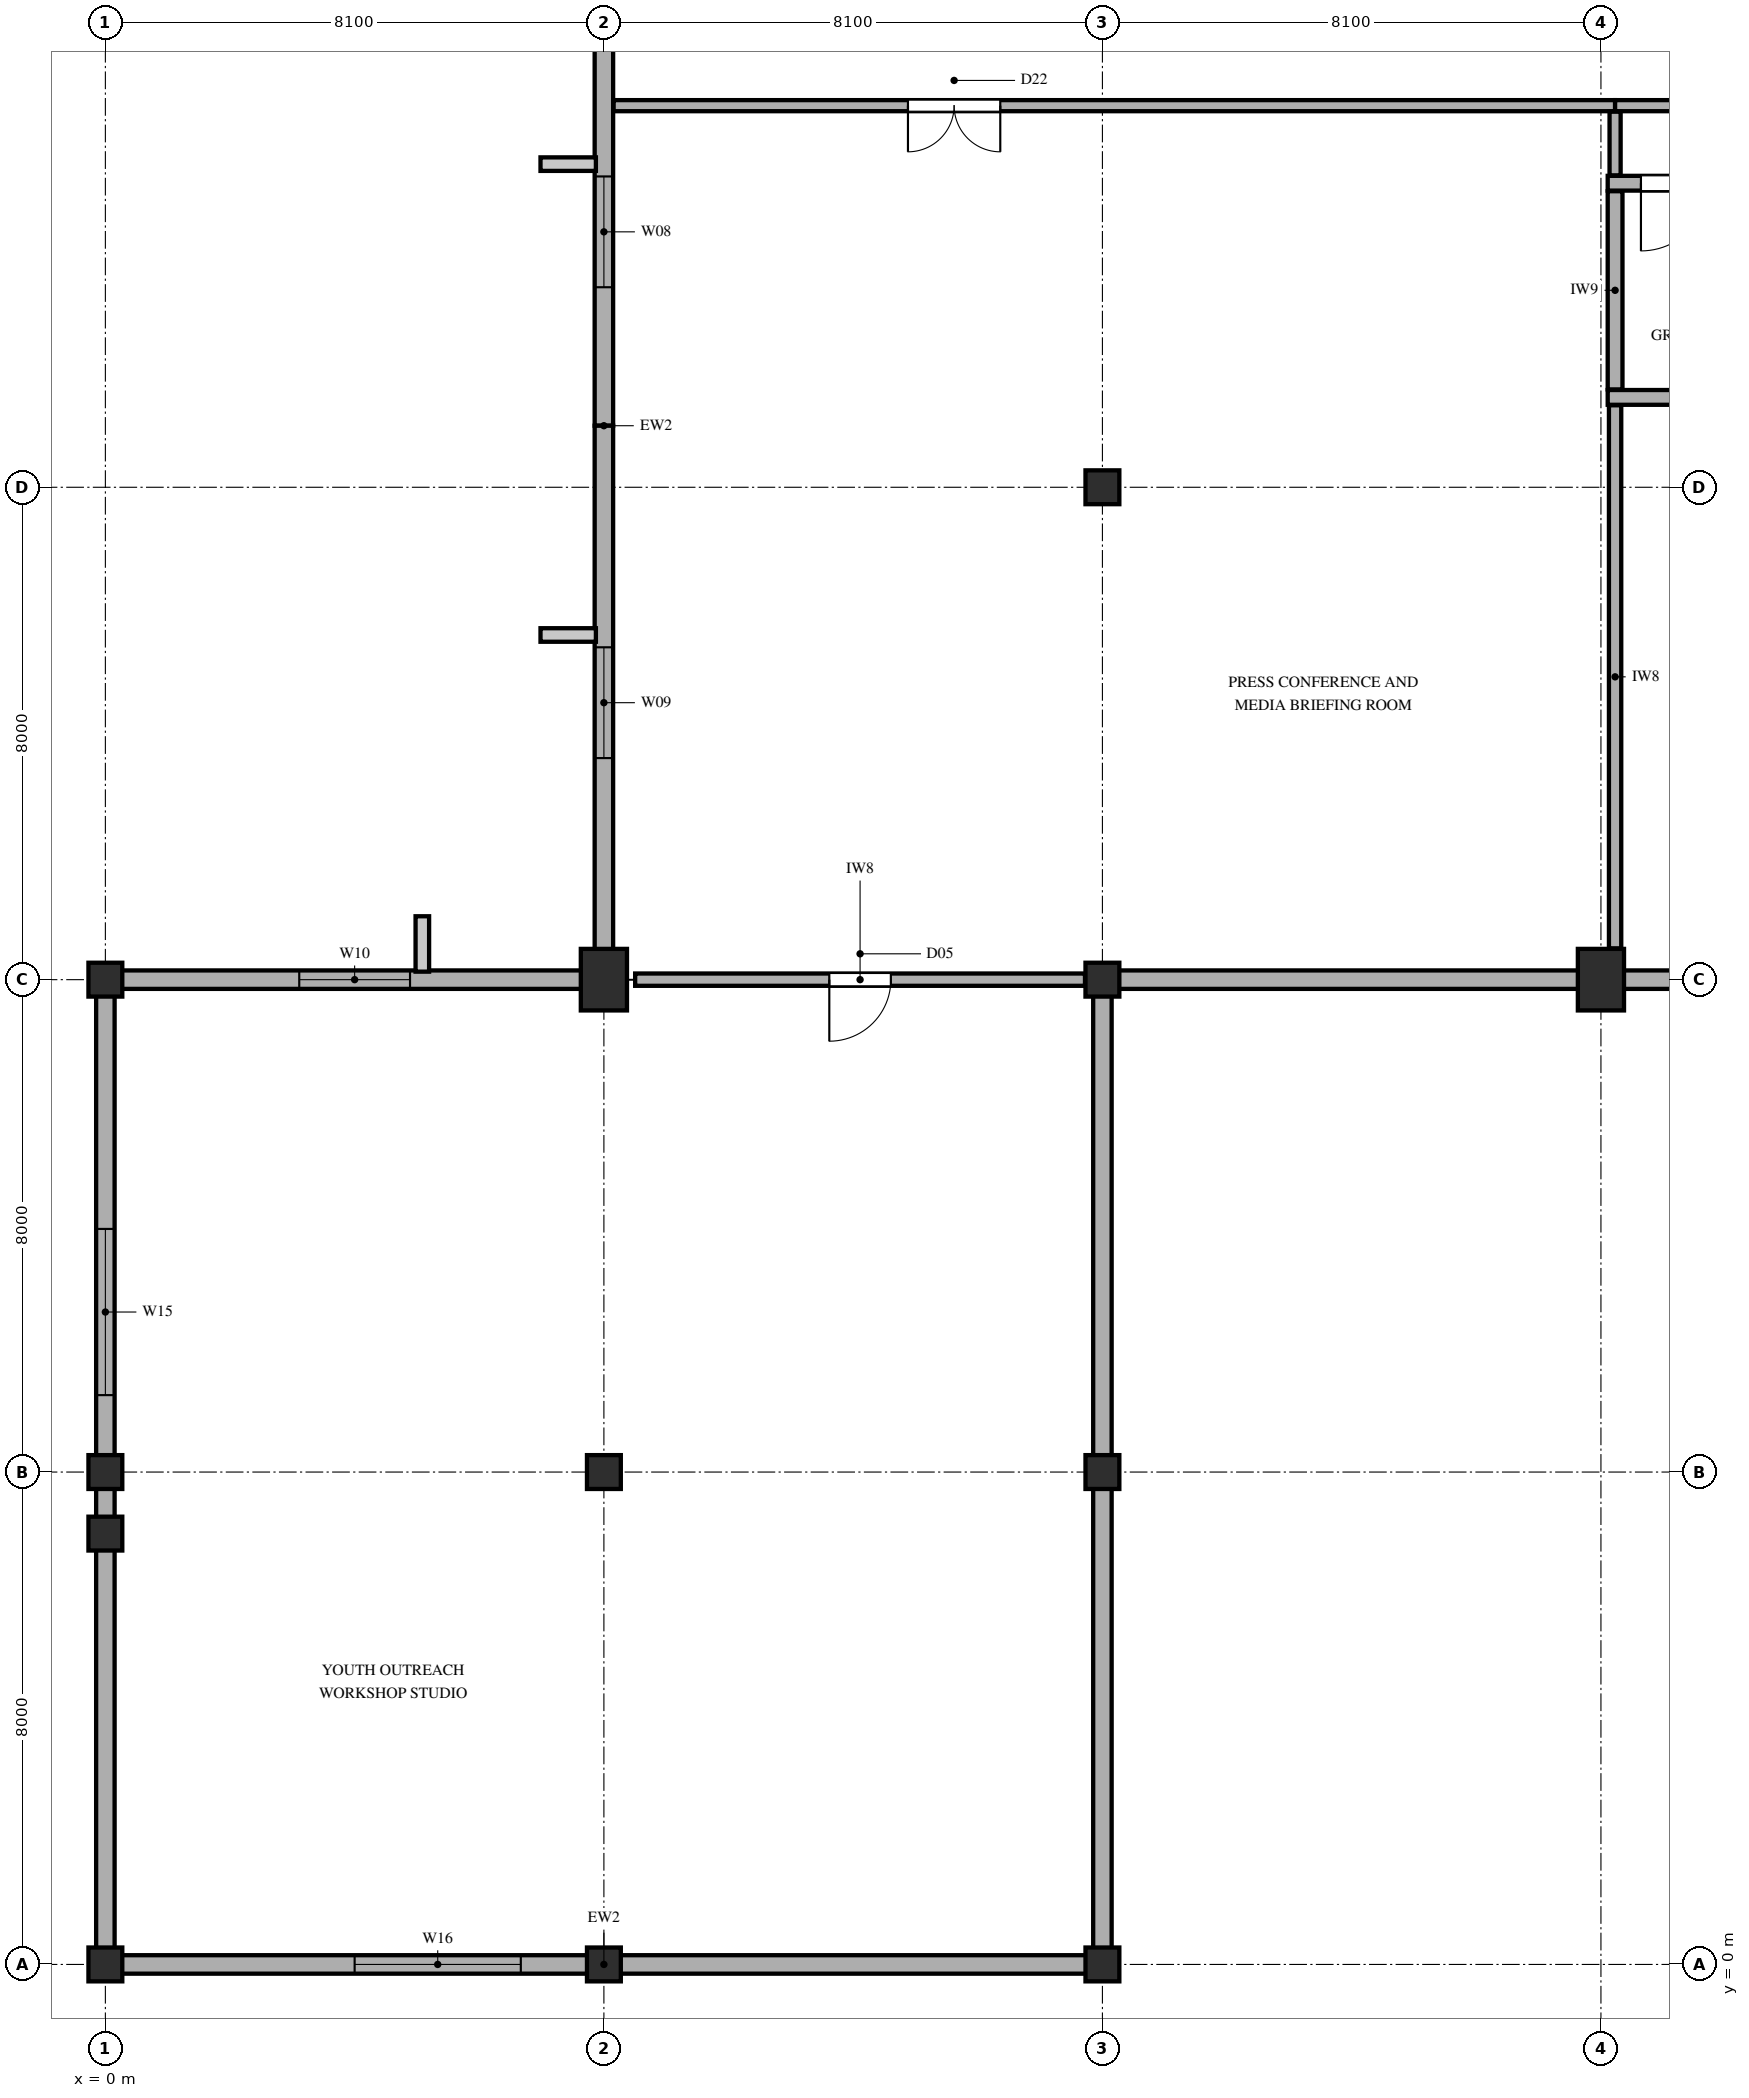
"""IFC4 building model, lengths in metres.
Left out: names, types, materials, properties, quantities, classifications, styles, units other than length and angle.
Written with IfcOpenShell. Run it as: python <this file> out.ifc"""

import sys

from ifc_helpers import new_model, si_unit, direction, frame, frame_2d, origin, origin_with_axes, origin_2d, place, context, subcontext, project, spatial, rectangle, extrude, element, fill, save


model = new_model("IFC4")
c1 = context("Model", 3, precision=1e-05, world=origin(), true_north=direction((0.0, 1.0)))
c2 = subcontext(c1, "Body", "Model", "MODEL_VIEW")
j1 = project(units=[si_unit("LENGTHUNIT", "METRE"), si_unit("PLANEANGLEUNIT", "RADIAN")], contexts=[c1])
p1 = place(None, origin())
s1 = spatial("IfcSite", under=j1, at=p1, CompositionType="ELEMENT")
p2 = place(p1, origin())
s2 = spatial("IfcBuilding", under=s1, at=p2, CompositionType="ELEMENT")
p3 = place(p2, frame((0.0, 0.0, 5.4)))
s3 = spatial("IfcBuildingStorey", under=s2, at=p3, CompositionType="ELEMENT", Elevation=5.4)
for number, where, z_axis, x_axis in (
    (1, (0.0, 0.0, 0.0), (0.0, 0.0, 1.0), (1.0, 0.0, 0.0)),
    (2, (0.0, 7.0, 0.0), (0.0, 0.0, 1.0), (1.0, 0.0, 0.0)),
    (3, (0.0, 8.0, 0.0), (0.0, 0.0, 1.0), (1.0, 0.0, 0.0)),
    (4, (0.0, 16.0, 0.0), (0.0, 0.0, 1.0), (1.0, 0.0, 0.0)),
    (5, (8.1, 0.0, 0.0), (0.0, 0.0, 1.0), (1.0, 0.0, 0.0)),
    (6, (8.1, 8.0, 0.0), (0.0, 0.0, 1.0), (1.0, 0.0, 0.0)),
):
    element("IfcColumn", number, at=place(p3, frame(where, z_axis=z_axis, x_axis=x_axis)), inside=s3, PredefinedType="COLUMN", context=c2, shape_type="SweptSolid", body=[
        extrude(rectangle(XDim=0.55, YDim=0.55, at=origin_2d()), origin(), (0.0, 0.0, 1.0), 4.8),
    ])
p4 = place(p3, frame((8.1, 16.0, 0.0), z_axis=(0.0, 0.0, 1.0), x_axis=(1.0, 0.0, 0.0)))
e7 = element("IfcColumn", 7, at=p4, inside=s3, PredefinedType="COLUMN", context=c2, shape_type="SweptSolid", body=[
    extrude(rectangle(XDim=0.75, YDim=1.0, at=origin_2d()), origin(), (0.0, 0.0, 1.0), 4.8),
])
for number, where, z_axis, x_axis in (
    (8, (16.2, 0.0, 0.0), (0.0, 0.0, 1.0), (1.0, 0.0, 0.0)),
    (9, (16.2, 8.0, 0.0), (0.0, 0.0, 1.0), (1.0, 0.0, 0.0)),
    (10, (16.2, 16.0, 0.0), (0.0, 0.0, 1.0), (1.0, 0.0, 0.0)),
    (11, (16.2, 24.0, 0.0), (0.0, 0.0, 1.0), (1.0, 0.0, 0.0)),
):
    element("IfcColumn", number, at=place(p3, frame(where, z_axis=z_axis, x_axis=x_axis)), inside=s3, PredefinedType="COLUMN", context=c2, shape_type="SweptSolid", body=[
        extrude(rectangle(XDim=0.55, YDim=0.55, at=origin_2d()), origin(), (0.0, 0.0, 1.0), 4.8),
    ])
p5 = place(p3, frame((24.3, 16.0, 0.0), z_axis=(0.0, 0.0, 1.0), x_axis=(1.0, 0.0, 0.0)))
e12 = element("IfcColumn", 12, at=p5, inside=s3, PredefinedType="COLUMN", context=c2, shape_type="SweptSolid", body=[
    extrude(rectangle(XDim=0.75, YDim=1.0, at=origin_2d()), origin(), (0.0, 0.0, 1.0), 4.8),
])
p6 = place(p3, frame((0.0, 16.0, 0.0), z_axis=(0.0, 0.0, 1.0), x_axis=(0.0, -1.0, 0.0)))
e13 = element("IfcWall", 13, at=p6, inside=s3, PredefinedType="SOLIDWALL", context=c2, shape_type="SweptSolid", body=[
    extrude(rectangle(XDim=16.0, YDim=0.3, at=frame_2d((8.0, 0.0))), origin(), (0.0, 0.0, 1.0), 3.912),
])
p7 = place(p6, frame((4.05, 0.0, 0.95)))
e14 = element("IfcOpeningElement", 14, at=p7, cuts=e13, PredefinedType="OPENING", context=c2, shape_type="SweptSolid", body=[
    extrude(rectangle(XDim=2.7, YDim=1.8, at=frame_2d((1.35, 0.9))), frame((0.0, 0.16, 0.0), z_axis=(0.0, -1.0, 0.0), x_axis=(1.0, 0.0, 0.0)), (0.0, 0.0, 1.0), 0.32),
])
p8 = place(p3, origin_with_axes())
e15 = element("IfcWall", 15, at=p8, inside=s3, PredefinedType="SOLIDWALL", context=c2, shape_type="SweptSolid", body=[
    extrude(rectangle(XDim=16.2, YDim=0.3, at=frame_2d((8.1, 0.0))), origin(), (0.0, 0.0, 1.0), 3.812),
])
p9 = place(p8, frame((4.05, 0.0, 0.85)))
e16 = element("IfcOpeningElement", 16, at=p9, cuts=e15, PredefinedType="OPENING", context=c2, shape_type="SweptSolid", body=[
    extrude(rectangle(XDim=2.7, YDim=2.1, at=frame_2d((1.35, 1.05))), frame((0.0, 0.16, 0.0), z_axis=(0.0, -1.0, 0.0), x_axis=(1.0, 0.0, 0.0)), (0.0, 0.0, 1.0), 0.32),
])
p10 = place(p3, frame((16.2, 0.0, 0.0), z_axis=(0.0, 0.0, 1.0), x_axis=(0.0, 1.0, 0.0)))
e17 = element("IfcWall", 17, at=p10, inside=s3, PredefinedType="SOLIDWALL", context=c2, shape_type="SweptSolid", body=[
    extrude(rectangle(XDim=16.0, YDim=0.3, at=frame_2d((8.0, 0.0))), origin(), (0.0, 0.0, 1.0), 3.912),
])
p11 = place(p3, frame((16.2, 16.0, 0.0), z_axis=(0.0, 0.0, 1.0), x_axis=(1.0, 0.0, 0.0)))
e18 = element("IfcWall", 18, at=p11, inside=s3, PredefinedType="SOLIDWALL", context=c2, shape_type="SweptSolid", body=[
    extrude(rectangle(XDim=16.2, YDim=0.3, at=frame_2d((8.1, 0.0))), origin(), (0.0, 0.0, 1.0), 3.812),
])
p12 = place(p3, frame((8.1, 34.0, 0.0), z_axis=(0.0, 0.0, 1.0), x_axis=(0.0, -1.0, 0.0)))
e19 = element("IfcWall", 19, at=p12, inside=s3, PredefinedType="SOLIDWALL", context=c2, shape_type="SweptSolid", body=[
    extrude(rectangle(XDim=9.0, YDim=0.3, at=frame_2d((4.5, 0.0))), origin(), (0.0, 0.0, 1.0), 3.312),
])
p13 = place(p12, frame((4.95, 0.0, 0.95)))
e20 = element("IfcOpeningElement", 20, at=p13, cuts=e19, PredefinedType="OPENING", context=c2, shape_type="SweptSolid", body=[
    extrude(rectangle(XDim=1.8, YDim=1.5, at=frame_2d((0.9, 0.75))), frame((0.0, 0.16, 0.0), z_axis=(0.0, -1.0, 0.0), x_axis=(1.0, 0.0, 0.0)), (0.0, 0.0, 1.0), 0.32),
])
p14 = place(p3, frame((8.1, 25.0, 0.0), z_axis=(0.0, 0.0, 1.0), x_axis=(0.0, -1.0, 0.0)))
e21 = element("IfcWall", 21, at=p14, inside=s3, PredefinedType="SOLIDWALL", context=c2, shape_type="SweptSolid", body=[
    extrude(rectangle(XDim=9.0, YDim=0.3, at=frame_2d((4.5, 0.0))), origin(), (0.0, 0.0, 1.0), 3.312),
])
p15 = place(p14, frame((3.6, 0.0, 0.95)))
e22 = element("IfcOpeningElement", 22, at=p15, cuts=e21, PredefinedType="OPENING", context=c2, shape_type="SweptSolid", body=[
    extrude(rectangle(XDim=1.8, YDim=1.8, at=frame_2d((0.9, 0.9))), frame((0.0, 0.16, 0.0), z_axis=(0.0, -1.0, 0.0), x_axis=(1.0, 0.0, 0.0)), (0.0, 0.0, 1.0), 0.32),
])
p16 = place(p3, frame((8.1, 16.0, 0.0), z_axis=(0.0, 0.0, 1.0), x_axis=(-1.0, 0.0, 0.0)))
e23 = element("IfcWall", 23, at=p16, inside=s3, PredefinedType="SOLIDWALL", context=c2, shape_type="SweptSolid", body=[
    extrude(rectangle(XDim=8.1, YDim=0.3, at=frame_2d((4.05, 0.0))), origin(), (0.0, 0.0, 1.0), 3.812),
])
p17 = place(p16, frame((3.15, 0.0, 0.85)))
e24 = element("IfcOpeningElement", 24, at=p17, cuts=e23, PredefinedType="OPENING", context=c2, shape_type="SweptSolid", body=[
    extrude(rectangle(XDim=1.8, YDim=2.1, at=frame_2d((0.9, 1.05))), frame((0.0, 0.16, 0.0), z_axis=(0.0, -1.0, 0.0), x_axis=(1.0, 0.0, 0.0)), (0.0, 0.0, 1.0), 0.32),
])
p18 = place(p3, frame((16.6, 12.35, 1.2), z_axis=(0.0, 0.0, 1.0), x_axis=(1.0, 0.0, 0.0)))
e25 = element("IfcWall", 25, at=p18, inside=s3, PredefinedType="PARAPET", context=c2, shape_type="SweptSolid", body=[
    extrude(rectangle(XDim=47.9, YDim=0.22, at=frame_2d((23.95, 0.0))), origin(), (0.0, 0.0, 1.0), 0.55),
])
p19 = place(p3, frame((16.47, 12.48, 1.2), z_axis=(0.0, 0.0, 1.0), x_axis=(0.0, 1.0, 0.0)))
e26 = element("IfcWall", 26, at=p19, inside=s3, PredefinedType="PARAPET", context=c2, shape_type="SweptSolid", body=[
    extrude(rectangle(XDim=3.32, YDim=0.22, at=frame_2d((1.66, 0.0))), origin(), (0.0, 0.0, 1.0), 0.55),
])
p20 = place(p3, frame((24.41, 25.46, 0.0), z_axis=(0.0, 0.0, 1.0), x_axis=(1.0, 0.0, 0.0)))
e27 = element("IfcWall", 27, at=p20, inside=s3, PredefinedType="PARTITIONING", context=c2, shape_type="SweptSolid", body=[
    extrude(rectangle(XDim=7.78, YDim=0.24, at=frame_2d((3.89, 0.0))), origin(), (0.0, 0.0, 1.0), 4.52),
])
p21 = place(p3, frame((24.41, 28.94, 0.0), z_axis=(0.0, 0.0, 1.0), x_axis=(1.0, 0.0, 0.0)))
e28 = element("IfcWall", 28, at=p21, inside=s3, PredefinedType="PARTITIONING", context=c2, shape_type="SweptSolid", body=[
    extrude(rectangle(XDim=7.78, YDim=0.24, at=frame_2d((3.89, 0.0))), origin(), (0.0, 0.0, 1.0), 4.52),
])
p22 = place(p21, frame((0.54, 0.0, 0.0)))
e29 = element("IfcOpeningElement", 29, at=p22, cuts=e28, PredefinedType="OPENING", context=c2, shape_type="SweptSolid", body=[
    extrude(rectangle(XDim=1.1, YDim=2.2, at=frame_2d((0.55, 1.1))), frame((0.0, 0.13, 0.0), z_axis=(0.0, -1.0, 0.0), x_axis=(1.0, 0.0, 0.0)), (0.0, 0.0, 1.0), 0.26),
])
p23 = place(p3, frame((24.53, 25.59, 0.0), z_axis=(0.0, 0.0, 1.0), x_axis=(0.0, 1.0, 0.0)))
e30 = element("IfcWall", 30, at=p23, inside=s3, PredefinedType="PARTITIONING", context=c2, shape_type="SweptSolid", body=[
    extrude(rectangle(XDim=3.22, YDim=0.24, at=frame_2d((1.61, 0.0))), origin(), (0.0, 0.0, 1.0), 3.312),
])
p24 = place(p3, frame((8.608, 16.0, 0.0), z_axis=(0.0, 0.0, 1.0), x_axis=(1.0, 0.0, 0.0)))
e31 = element("IfcWall", 31, at=p24, inside=s3, PredefinedType="PARTITIONING", context=c2, shape_type="SweptSolid", body=[
    extrude(rectangle(XDim=7.309, YDim=0.2, at=frame_2d((3.655, 0.0))), origin(), (0.0, 0.0, 1.0), 3.812),
])
p25 = place(p24, frame((3.155, 0.0, 0.0)))
e32 = element("IfcOpeningElement", 32, at=p25, cuts=e31, PredefinedType="OPENING", context=c2, shape_type="SweptSolid", body=[
    extrude(rectangle(XDim=1.0, YDim=2.2, at=frame_2d((0.5, 1.1))), frame((0.0, 0.11, 0.0), z_axis=(0.0, -1.0, 0.0), x_axis=(1.0, 0.0, 0.0)), (0.0, 0.0, 1.0), 0.22),
])
p26 = place(p3, frame((8.258, 30.2, 0.0), z_axis=(0.0, 0.0, 1.0), x_axis=(1.0, 0.0, 0.0)))
e33 = element("IfcWall", 33, at=p26, inside=s3, PredefinedType="PARTITIONING", context=c2, shape_type="SweptSolid", body=[
    extrude(rectangle(XDim=16.272, YDim=0.18, at=frame_2d((8.136, 0.0))), origin(), (0.0, 0.0, 1.0), 4.52),
])
p27 = place(p26, frame((4.782, 0.0, 0.0)))
e34 = element("IfcOpeningElement", 34, at=p27, cuts=e33, PredefinedType="OPENING", context=c2, shape_type="SweptSolid", body=[
    extrude(rectangle(XDim=1.5, YDim=2.3, at=frame_2d((0.75, 1.15))), frame((0.0, 0.1, 0.0), z_axis=(0.0, -1.0, 0.0), x_axis=(1.0, 0.0, 0.0)), (0.0, 0.0, 1.0), 0.2),
])
p28 = place(p3, frame((24.53, 30.2, 0.0), z_axis=(0.0, 0.0, 1.0), x_axis=(1.0, 0.0, 0.0)))
e35 = element("IfcWall", 35, at=p28, inside=s3, PredefinedType="PARTITIONING", context=c2, shape_type="SweptSolid", body=[
    extrude(rectangle(XDim=7.54, YDim=0.18, at=frame_2d((3.77, 0.0))), origin(), (0.0, 0.0, 1.0), 4.52),
])
p29 = place(p28, frame((3.22, 0.0, 0.0)))
e36 = element("IfcOpeningElement", 36, at=p29, cuts=e35, PredefinedType="OPENING", context=c2, shape_type="SweptSolid", body=[
    extrude(rectangle(XDim=1.1, YDim=2.2, at=frame_2d((0.55, 1.1))), frame((0.0, 0.1, 0.0), z_axis=(0.0, -1.0, 0.0), x_axis=(1.0, 0.0, 0.0)), (0.0, 0.0, 1.0), 0.2),
])
p30 = place(p3, frame((24.53, 16.508, 0.0), z_axis=(0.0, 0.0, 1.0), x_axis=(0.0, 1.0, 0.0)))
e37 = element("IfcWall", 37, at=p30, inside=s3, PredefinedType="PARTITIONING", context=c2, shape_type="SweptSolid", body=[
    extrude(rectangle(XDim=8.824, YDim=0.2, at=frame_2d((4.412, 0.0))), origin(), (0.0, 0.0, 1.0), 3.312),
])
p31 = place(p3, frame((24.53, 29.068, 0.0), z_axis=(0.0, 0.0, 1.0), x_axis=(0.0, 1.0, 0.0)))
e38 = element("IfcWall", 38, at=p31, inside=s3, PredefinedType="PARTITIONING", context=c2, shape_type="SweptSolid", body=[
    extrude(rectangle(XDim=1.034, YDim=0.18, at=frame_2d((0.517, 0.0))), origin(), (0.0, 0.0, 1.0), 3.312),
])
p32 = place(p7, origin())
e39 = element("IfcWindow", 39, at=p32, inside=s3, PartitioningType="TRIPLE_PANEL_VERTICAL", PredefinedType="WINDOW", context=c2, shape_type="SweptSolid", body=[
    extrude(rectangle(XDim=2.7, YDim=1.8, at=frame_2d((1.35, 0.9))), frame((0.0, 0.03, 0.0), z_axis=(0.0, -1.0, 0.0), x_axis=(1.0, 0.0, 0.0)), (0.0, 0.0, 1.0), 0.06),
])
fill(e14, e39)
p33 = place(p9, origin())
e40 = element("IfcWindow", 40, at=p33, inside=s3, PartitioningType="TRIPLE_PANEL_VERTICAL", PredefinedType="WINDOW", context=c2, shape_type="SweptSolid", body=[
    extrude(rectangle(XDim=2.7, YDim=2.1, at=frame_2d((1.35, 1.05))), frame((0.0, 0.03, 0.0), z_axis=(0.0, -1.0, 0.0), x_axis=(1.0, 0.0, 0.0)), (0.0, 0.0, 1.0), 0.06),
])
fill(e16, e40)
p34 = place(p13, origin())
e41 = element("IfcWindow", 41, at=p34, inside=s3, PartitioningType="DOUBLE_PANEL_VERTICAL", PredefinedType="WINDOW", context=c2, shape_type="SweptSolid", body=[
    extrude(rectangle(XDim=1.8, YDim=1.5, at=frame_2d((0.9, 0.75))), frame((0.0, 0.03, 0.0), z_axis=(0.0, -1.0, 0.0), x_axis=(1.0, 0.0, 0.0)), (0.0, 0.0, 1.0), 0.06),
])
fill(e20, e41)
p35 = place(p15, origin())
e42 = element("IfcWindow", 42, at=p35, inside=s3, PartitioningType="DOUBLE_PANEL_VERTICAL", PredefinedType="WINDOW", context=c2, shape_type="SweptSolid", body=[
    extrude(rectangle(XDim=1.8, YDim=1.8, at=frame_2d((0.9, 0.9))), frame((0.0, 0.03, 0.0), z_axis=(0.0, -1.0, 0.0), x_axis=(1.0, 0.0, 0.0)), (0.0, 0.0, 1.0), 0.06),
])
fill(e22, e42)
p36 = place(p17, origin())
e43 = element("IfcWindow", 43, at=p36, inside=s3, PartitioningType="DOUBLE_PANEL_VERTICAL", PredefinedType="WINDOW", context=c2, shape_type="SweptSolid", body=[
    extrude(rectangle(XDim=1.8, YDim=2.1, at=frame_2d((0.9, 1.05))), frame((0.0, 0.03, 0.0), z_axis=(0.0, -1.0, 0.0), x_axis=(1.0, 0.0, 0.0)), (0.0, 0.0, 1.0), 0.06),
])
fill(e24, e43)
p37 = place(p3, frame((0.0, 0.0, 0.9)))
p38 = place(p37, frame((20.25, 14.1, 0.0)))
p39 = place(p38, frame((0.0, 0.0, 0.3)))
e44 = element("IfcDoor", 44, at=p39, inside=s3, OperationType="SINGLE_SWING_LEFT", PredefinedType="TRAPDOOR", context=c2, shape_type="SweptSolid", body=[
    extrude(rectangle(XDim=1.0, YDim=1.2, at=origin_2d()), origin(), (0.0, 0.0, 1.0), 0.05),
])
p40 = place(p22, frame((1.1, 0.0, 0.0), z_axis=(0.0, 0.0, 1.0), x_axis=(-1.0, 0.0, 0.0)))
e45 = element("IfcDoor", 45, at=p40, inside=s3, OperationType="SINGLE_SWING_LEFT", PredefinedType="DOOR", context=c2, shape_type="SweptSolid", body=[
    extrude(rectangle(XDim=1.1, YDim=2.2, at=frame_2d((0.55, 1.1))), frame((0.0, 0.025, 0.0), z_axis=(0.0, -1.0, 0.0), x_axis=(1.0, 0.0, 0.0)), (0.0, 0.0, 1.0), 0.05),
])
fill(e29, e45)
p41 = place(p25, frame((1.0, 0.0, 0.0), z_axis=(0.0, 0.0, 1.0), x_axis=(-1.0, 0.0, 0.0)))
e46 = element("IfcDoor", 46, at=p41, inside=s3, OperationType="SINGLE_SWING_LEFT", PredefinedType="DOOR", context=c2, shape_type="SweptSolid", body=[
    extrude(rectangle(XDim=1.0, YDim=2.2, at=frame_2d((0.5, 1.1))), frame((0.0, 0.025, 0.0), z_axis=(0.0, -1.0, 0.0), x_axis=(1.0, 0.0, 0.0)), (0.0, 0.0, 1.0), 0.05),
])
fill(e32, e46)
p42 = place(p27, frame((1.5, 0.0, 0.0), z_axis=(0.0, 0.0, 1.0), x_axis=(-1.0, 0.0, 0.0)))
e47 = element("IfcDoor", 47, at=p42, inside=s3, OperationType="DOUBLE_DOOR_SINGLE_SWING", PredefinedType="DOOR", context=c2, shape_type="SweptSolid", body=[
    extrude(rectangle(XDim=1.5, YDim=2.3, at=frame_2d((0.75, 1.15))), frame((0.0, 0.025, 0.0), z_axis=(0.0, -1.0, 0.0), x_axis=(1.0, 0.0, 0.0)), (0.0, 0.0, 1.0), 0.05),
])
fill(e34, e47)
save(model, sys.argv[1])
